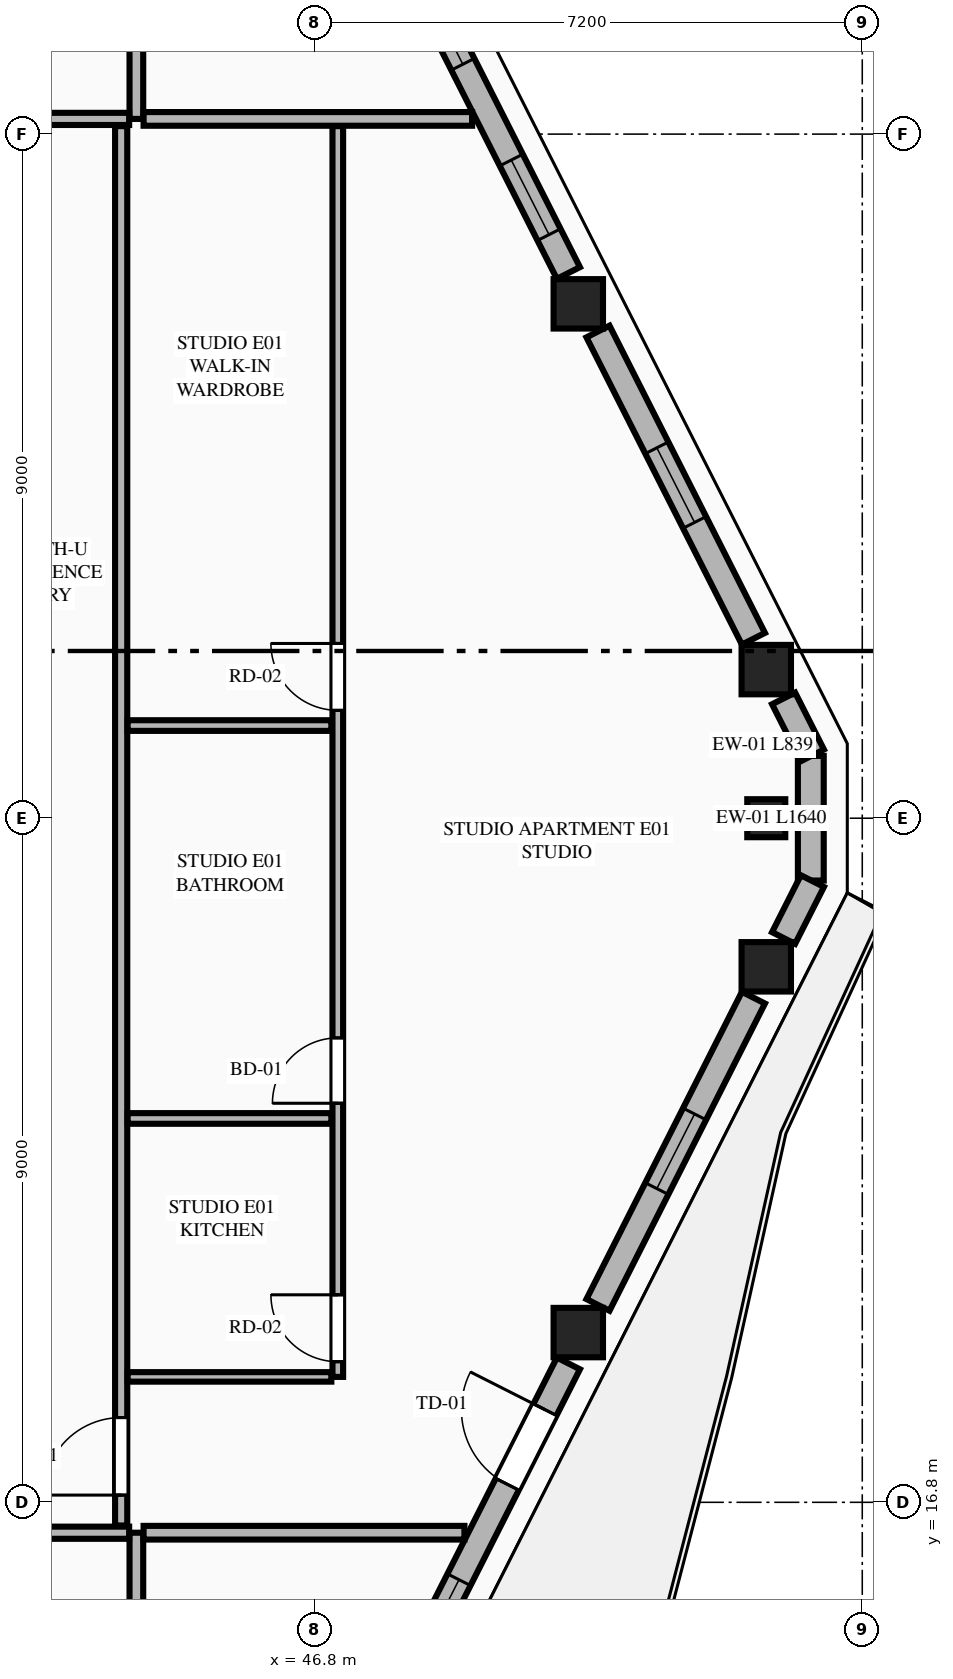
"""IFC4 building model, lengths in metres.
Left out: names, types, materials, properties, quantities, classifications, styles, units other than length and angle.
Written with IfcOpenShell. Run it as: python <this file> out.ifc"""

import sys

from ifc_helpers import new_model, si_unit, direction, frame, frame_2d, origin, origin_2d, place, context, subcontext, project, spatial, rectangle, extrude, element, fill, save


model = new_model("IFC4")
c1 = context("Model", 3, precision=1e-05, world=origin(), true_north=direction((0.0, 1.0)))
c2 = subcontext(c1, "Body", "Model", "MODEL_VIEW")
j1 = project(units=[si_unit("LENGTHUNIT", "METRE"), si_unit("PLANEANGLEUNIT", "RADIAN")], contexts=[c1])
p1 = place(None, origin())
s1 = spatial("IfcSite", under=j1, at=p1, CompositionType="ELEMENT")
p2 = place(p1, origin())
s2 = spatial("IfcBuilding", under=s1, at=p2, CompositionType="ELEMENT")
p3 = place(p2, frame((0.0, 0.0, 274.45)))
s3 = spatial("IfcBuildingStorey", under=s2, at=p3, CompositionType="ELEMENT", Elevation=274.45)
for number, where, z_axis, x_axis in (
    (1, (50.264, 19.033, 0.0), (0.0, 0.0, 1.0), (1.0, 0.0, 0.0)),
    (2, (52.737, 23.845, 0.0), (0.0, 0.0, 1.0), (1.0, 0.0, 0.0)),
    (3, (52.737, 27.755, 0.0), (0.0, 0.0, 1.0), (1.0, 0.0, 0.0)),
    (4, (50.264, 32.567, 0.0), (0.0, 0.0, 1.0), (1.0, 0.0, 0.0)),
):
    element("IfcColumn", number, at=place(p3, frame(where, z_axis=z_axis, x_axis=x_axis)), inside=s3, PredefinedType="COLUMN", context=c2, shape_type="SweptSolid", body=[
        extrude(rectangle(XDim=0.65, YDim=0.65, at=origin_2d()), origin(), (0.0, 0.0, 1.0), 3.65),
    ])
p4 = place(p3, frame((52.737, 25.8, 0.0), z_axis=(0.0, 0.0, 1.0), x_axis=(0.0, 1.0, 0.0)))
e5 = element("IfcColumn", 5, at=p4, inside=s3, PredefinedType="PILASTER", context=c2, shape_type="SweptSolid", body=[
    extrude(rectangle(XDim=0.5, YDim=0.35, at=origin_2d()), origin(), (0.0, 0.0, 1.0), 3.65),
])
p5 = place(p3, frame((53.323, 24.98, 0.0), z_axis=(0.0, 0.0, 1.0), x_axis=(0.0, 1.0, 0.0)))
e6 = element("IfcWall", 6, at=p5, inside=s3, PredefinedType="STANDARD", context=c2, shape_type="SweptSolid", body=[
    extrude(rectangle(XDim=1.64, YDim=0.34, at=frame_2d((0.82, 0.0))), origin(), (0.0, 0.0, 1.0), 3.37),
])
p6 = place(p3, frame((48.002, 14.413, 0.0), z_axis=(0.0, 0.0, 1.0), x_axis=(0.451468341582, 0.892287137949, 0.0)))
e7 = element("IfcWall", 7, at=p6, inside=s3, PredefinedType="STANDARD", context=c2, shape_type="SweptSolid", body=[
    extrude(rectangle(XDim=4.723, YDim=0.34, at=frame_2d((2.361, 0.0))), origin(), (0.0, 0.0, 1.0), 2.46),
])
p7 = place(p6, frame((2.941, 0.0, 0.0)))
e8 = element("IfcOpeningElement", 8, at=p7, cuts=e7, PredefinedType="OPENING", context=c2, shape_type="SweptSolid", body=[
    extrude(rectangle(XDim=1.1, YDim=2.25, at=frame_2d((0.55, 1.125))), frame((0.0, 0.18, 0.0), z_axis=(0.0, -1.0, 0.0), x_axis=(1.0, 0.0, 0.0)), (0.0, 0.0, 1.0), 0.36),
])
p8 = place(p6, frame((0.434, 0.0, 0.75)))
e9 = element("IfcOpeningElement", 9, at=p8, cuts=e7, PredefinedType="OPENING", context=c2, shape_type="SweptSolid", body=[
    extrude(rectangle(XDim=1.1, YDim=1.56, at=frame_2d((0.55, 0.78))), frame((0.0, 0.18, 0.0), z_axis=(0.0, -1.0, 0.0), x_axis=(1.0, 0.0, 0.0)), (0.0, 0.0, 1.0), 0.36),
])
p9 = place(p3, frame((50.523, 19.397, 0.0), z_axis=(0.0, 0.0, 1.0), x_axis=(0.45147697324, 0.892282770558, 0.0)))
e10 = element("IfcWall", 10, at=p9, inside=s3, PredefinedType="STANDARD", context=c2, shape_type="SweptSolid", body=[
    extrude(rectangle(XDim=4.53, YDim=0.34, at=frame_2d((2.265, 0.0))), origin(), (0.0, 0.0, 1.0), 2.46),
])
p10 = place(p9, frame((1.715, 0.0, 0.75)))
e11 = element("IfcOpeningElement", 11, at=p10, cuts=e10, PredefinedType="OPENING", context=c2, shape_type="SweptSolid", body=[
    extrude(rectangle(XDim=1.1, YDim=1.56, at=frame_2d((0.55, 0.78))), frame((0.0, 0.18, 0.0), z_axis=(0.0, -1.0, 0.0), x_axis=(1.0, 0.0, 0.0)), (0.0, 0.0, 1.0), 0.36),
])
p11 = place(p3, frame((52.965, 24.224, 0.0), z_axis=(0.0, 0.0, 1.0), x_axis=(0.4515140893, 0.892263989615, 0.0)))
e12 = element("IfcWall", 12, at=p11, inside=s3, PredefinedType="STANDARD", context=c2, shape_type="SweptSolid", body=[
    extrude(rectangle(XDim=0.839, YDim=0.34, at=frame_2d((0.419, 0.0))), origin(), (0.0, 0.0, 1.0), 3.37),
])
p12 = place(p3, frame((53.344, 26.627, 0.0), z_axis=(0.0, 0.0, 1.0), x_axis=(-0.45139691133, 0.892323275748, 0.0)))
e13 = element("IfcWall", 13, at=p12, inside=s3, PredefinedType="STANDARD", context=c2, shape_type="SweptSolid", body=[
    extrude(rectangle(XDim=0.839, YDim=0.34, at=frame_2d((0.42, 0.0))), origin(), (0.0, 0.0, 1.0), 3.37),
])
p13 = place(p3, frame((52.568, 28.161, 0.0), z_axis=(0.0, 0.0, 1.0), x_axis=(-0.45147697324, 0.892282770558, 0.0)))
e14 = element("IfcWall", 14, at=p13, inside=s3, PredefinedType="STANDARD", context=c2, shape_type="SweptSolid", body=[
    extrude(rectangle(XDim=4.53, YDim=0.34, at=frame_2d((2.265, 0.0))), origin(), (0.0, 0.0, 1.0), 2.46),
])
p14 = place(p13, frame((1.715, 0.0, 0.75)))
e15 = element("IfcOpeningElement", 15, at=p14, cuts=e14, PredefinedType="OPENING", context=c2, shape_type="SweptSolid", body=[
    extrude(rectangle(XDim=1.1, YDim=1.56, at=frame_2d((0.55, 0.78))), frame((0.0, 0.18, 0.0), z_axis=(0.0, -1.0, 0.0), x_axis=(1.0, 0.0, 0.0)), (0.0, 0.0, 1.0), 0.36),
])
p15 = place(p3, frame((50.134, 32.973, 0.0), z_axis=(0.0, 0.0, 1.0), x_axis=(-0.451447516904, 0.892297674255, 0.0)))
e16 = element("IfcWall", 16, at=p15, inside=s3, PredefinedType="STANDARD", context=c2, shape_type="SweptSolid", body=[
    extrude(rectangle(XDim=4.723, YDim=0.34, at=frame_2d((2.361, 0.0))), origin(), (0.0, 0.0, 1.0), 2.46),
])
p16 = place(p15, frame((0.565, 0.0, 0.75)))
e17 = element("IfcOpeningElement", 17, at=p16, cuts=e16, PredefinedType="OPENING", context=c2, shape_type="SweptSolid", body=[
    extrude(rectangle(XDim=1.1, YDim=1.56, at=frame_2d((0.55, 0.78))), frame((0.0, 0.18, 0.0), z_axis=(0.0, -1.0, 0.0), x_axis=(1.0, 0.0, 0.0)), (0.0, 0.0, 1.0), 0.36),
])
p17 = place(p15, frame((3.077, 0.0, 0.75)))
e18 = element("IfcOpeningElement", 18, at=p17, cuts=e16, PredefinedType="OPENING", context=c2, shape_type="SweptSolid", body=[
    extrude(rectangle(XDim=1.1, YDim=1.56, at=frame_2d((0.55, 0.78))), frame((0.0, 0.18, 0.0), z_axis=(0.0, -1.0, 0.0), x_axis=(1.0, 0.0, 0.0)), (0.0, 0.0, 1.0), 0.36),
])
p18 = place(p3, frame((44.45, 8.119, 0.0), z_axis=(0.0, 0.0, 1.0), x_axis=(0.0, 1.0, 0.0)))
e19 = element("IfcWall", 19, at=p18, inside=s3, PredefinedType="PARTITIONING", context=c2, shape_type="SweptSolid", body=[
    extrude(rectangle(XDim=8.281, YDim=0.18, at=frame_2d((4.141, 0.0))), origin(), (0.0, 0.0, 1.0), 3.37),
])
p19 = place(p3, frame((35.749, 16.4, 0.0), z_axis=(0.0, 0.0, 1.0), x_axis=(1.0, 0.0, 0.0)))
e20 = element("IfcWall", 20, at=p19, inside=s3, PredefinedType="PARTITIONING", context=c2, shape_type="SweptSolid", body=[
    extrude(rectangle(XDim=8.606, YDim=0.16, at=frame_2d((4.303, 0.0))), origin(), (0.0, 0.0, 1.0), 3.37),
])
p20 = place(p19, frame((0.355, 0.0, 0.0)))
e21 = element("IfcOpeningElement", 21, at=p20, cuts=e20, PredefinedType="OPENING", context=c2, shape_type="SweptSolid", body=[
    extrude(rectangle(XDim=1.02, YDim=2.25, at=frame_2d((0.51, 1.125))), frame((0.0, 0.09, 0.0), z_axis=(0.0, -1.0, 0.0), x_axis=(1.0, 0.0, 0.0)), (0.0, 0.0, 1.0), 0.18),
])
p21 = place(p3, frame((44.45, 35.0, 0.0), z_axis=(0.0, 0.0, 1.0), x_axis=(0.0, 1.0, 0.0)))
e22 = element("IfcWall", 22, at=p21, inside=s3, PredefinedType="PARTITIONING", context=c2, shape_type="SweptSolid", body=[
    extrude(rectangle(XDim=8.481, YDim=0.18, at=frame_2d((4.24, 0.0))), origin(), (0.0, 0.0, 1.0), 3.37),
])
p22 = place(p3, frame((35.749, 35.0, 0.0), z_axis=(0.0, 0.0, 1.0), x_axis=(1.0, 0.0, 0.0)))
e23 = element("IfcWall", 23, at=p22, inside=s3, PredefinedType="PARTITIONING", context=c2, shape_type="SweptSolid", body=[
    extrude(rectangle(XDim=8.606, YDim=0.16, at=frame_2d((4.303, 0.0))), origin(), (0.0, 0.0, 1.0), 3.37),
])
p23 = place(p22, frame((6.351, 0.0, 0.0)))
e24 = element("IfcOpeningElement", 24, at=p23, cuts=e23, PredefinedType="OPENING", context=c2, shape_type="SweptSolid", body=[
    extrude(rectangle(XDim=1.02, YDim=2.25, at=frame_2d((0.51, 1.125))), frame((0.0, 0.09, 0.0), z_axis=(0.0, -1.0, 0.0), x_axis=(1.0, 0.0, 0.0)), (0.0, 0.0, 1.0), 0.18),
])
p24 = place(p3, frame((44.545, 16.4, 0.0), z_axis=(0.0, 0.0, 1.0), x_axis=(1.0, 0.0, 0.0)))
e25 = element("IfcWall", 25, at=p24, inside=s3, PredefinedType="PARTITIONING", context=c2, shape_type="SweptSolid", body=[
    extrude(rectangle(XDim=4.221, YDim=0.18, at=frame_2d((2.111, 0.0))), origin(), (0.0, 0.0, 1.0), 3.37),
])
p25 = place(p3, frame((44.545, 35.0, 0.0), z_axis=(0.0, 0.0, 1.0), x_axis=(1.0, 0.0, 0.0)))
e26 = element("IfcWall", 26, at=p25, inside=s3, PredefinedType="PARTITIONING", context=c2, shape_type="SweptSolid", body=[
    extrude(rectangle(XDim=4.322, YDim=0.18, at=frame_2d((2.161, 0.0))), origin(), (0.0, 0.0, 1.0), 3.37),
])
p26 = place(p3, frame((44.25, 16.495, 0.0), z_axis=(0.0, 0.0, 1.0), x_axis=(0.0, 1.0, 0.0)))
e27 = element("IfcWall", 27, at=p26, inside=s3, PredefinedType="PARTITIONING", context=c2, shape_type="SweptSolid", body=[
    extrude(rectangle(XDim=18.41, YDim=0.16, at=frame_2d((9.205, 0.0))), origin(), (0.0, 0.0, 1.0), 3.057),
])
p27 = place(p26, frame((0.4, 0.0, 0.0)))
e28 = element("IfcOpeningElement", 28, at=p27, cuts=e27, PredefinedType="OPENING", context=c2, shape_type="SweptSolid", body=[
    extrude(rectangle(XDim=1.02, YDim=2.25, at=frame_2d((0.51, 1.125))), frame((0.0, 0.09, 0.0), z_axis=(0.0, -1.0, 0.0), x_axis=(1.0, 0.0, 0.0)), (0.0, 0.0, 1.0), 0.18),
])
p28 = place(p3, frame((44.335, 18.45, 0.0), z_axis=(0.0, 0.0, 1.0), x_axis=(1.0, 0.0, 0.0)))
e29 = element("IfcWall", 29, at=p28, inside=s3, PredefinedType="PARTITIONING", context=c2, shape_type="SweptSolid", body=[
    extrude(rectangle(XDim=2.68, YDim=0.125, at=frame_2d((1.34, 0.0))), origin(), (0.0, 0.0, 1.0), 3.37),
])
p29 = place(p3, frame((47.1, 18.45, 0.0), z_axis=(0.0, 0.0, 1.0), x_axis=(0.0, 1.0, 0.0)))
e30 = element("IfcWall", 30, at=p29, inside=s3, PredefinedType="PLUMBINGWALL", context=c2, shape_type="SweptSolid", body=[
    extrude(rectangle(XDim=16.455, YDim=0.14, at=frame_2d((8.228, 0.0))), origin(), (0.0, 0.0, 1.0), 3.37),
])
p30 = place(p29, frame((3.6, 0.0, 0.0)))
e31 = element("IfcOpeningElement", 31, at=p30, cuts=e30, PredefinedType="OPENING", context=c2, shape_type="SweptSolid", body=[
    extrude(rectangle(XDim=0.86, YDim=2.1, at=frame_2d((0.43, 1.05))), frame((0.0, 0.08, 0.0), z_axis=(0.0, -1.0, 0.0), x_axis=(1.0, 0.0, 0.0)), (0.0, 0.0, 1.0), 0.16),
])
p31 = place(p29, frame((8.769, 0.0, 0.0)))
e32 = element("IfcOpeningElement", 32, at=p31, cuts=e30, PredefinedType="OPENING", context=c2, shape_type="SweptSolid", body=[
    extrude(rectangle(XDim=0.88, YDim=2.15, at=frame_2d((0.44, 1.075))), frame((0.0, 0.08, 0.0), z_axis=(0.0, -1.0, 0.0), x_axis=(1.0, 0.0, 0.0)), (0.0, 0.0, 1.0), 0.16),
])
p32 = place(p29, frame((0.2, 0.0, 0.0)))
e33 = element("IfcOpeningElement", 33, at=p32, cuts=e30, PredefinedType="OPENING", context=c2, shape_type="SweptSolid", body=[
    extrude(rectangle(XDim=0.88, YDim=2.15, at=frame_2d((0.44, 1.075))), frame((0.0, 0.08, 0.0), z_axis=(0.0, -1.0, 0.0), x_axis=(1.0, 0.0, 0.0)), (0.0, 0.0, 1.0), 0.16),
])
for number, where, z_axis, x_axis in (
    (34, (44.335, 21.85, 0.0), (0.0, 0.0, 1.0), (1.0, 0.0, 0.0)),
    (35, (44.335, 27.019, 0.0), (0.0, 0.0, 1.0), (1.0, 0.0, 0.0)),
):
    element("IfcWall", number, at=place(p3, frame(where, z_axis=z_axis, x_axis=x_axis)), inside=s3, PredefinedType="PLUMBINGWALL", context=c2, shape_type="SweptSolid", body=[
        extrude(rectangle(XDim=2.68, YDim=0.14, at=frame_2d((1.34, 0.0))), origin(), (0.0, 0.0, 1.0), 3.37),
    ])
p33 = place(p7, origin())
e36 = element("IfcDoor", 36, at=p33, inside=s3, OperationType="SINGLE_SWING_RIGHT", PredefinedType="DOOR", context=c2, shape_type="SweptSolid", body=[
    extrude(rectangle(XDim=1.1, YDim=2.25, at=frame_2d((0.55, 1.125))), frame((0.0, 0.025, 0.0), z_axis=(0.0, -1.0, 0.0), x_axis=(1.0, 0.0, 0.0)), (0.0, 0.0, 1.0), 0.05),
])
fill(e8, e36)
p34 = place(p10, origin())
e37 = element("IfcWindow", 37, at=p34, inside=s3, PartitioningType="SINGLE_PANEL", PredefinedType="WINDOW", context=c2, shape_type="SweptSolid", body=[
    extrude(rectangle(XDim=1.1, YDim=1.56, at=frame_2d((0.55, 0.78))), frame((0.0, 0.03, 0.0), z_axis=(0.0, -1.0, 0.0), x_axis=(1.0, 0.0, 0.0)), (0.0, 0.0, 1.0), 0.06),
])
fill(e11, e37)
p35 = place(p14, origin())
e38 = element("IfcWindow", 38, at=p35, inside=s3, PartitioningType="SINGLE_PANEL", PredefinedType="WINDOW", context=c2, shape_type="SweptSolid", body=[
    extrude(rectangle(XDim=1.1, YDim=1.56, at=frame_2d((0.55, 0.78))), frame((0.0, 0.03, 0.0), z_axis=(0.0, -1.0, 0.0), x_axis=(1.0, 0.0, 0.0)), (0.0, 0.0, 1.0), 0.06),
])
fill(e15, e38)
p36 = place(p16, origin())
e39 = element("IfcWindow", 39, at=p36, inside=s3, PartitioningType="SINGLE_PANEL", PredefinedType="WINDOW", context=c2, shape_type="SweptSolid", body=[
    extrude(rectangle(XDim=1.1, YDim=1.56, at=frame_2d((0.55, 0.78))), frame((0.0, 0.03, 0.0), z_axis=(0.0, -1.0, 0.0), x_axis=(1.0, 0.0, 0.0)), (0.0, 0.0, 1.0), 0.06),
])
fill(e17, e39)
p37 = place(p30, origin())
e40 = element("IfcDoor", 40, at=p37, inside=s3, OperationType="SINGLE_SWING_LEFT", PredefinedType="DOOR", context=c2, shape_type="SweptSolid", body=[
    extrude(rectangle(XDim=0.86, YDim=2.1, at=frame_2d((0.43, 1.05))), frame((0.0, 0.025, 0.0), z_axis=(0.0, -1.0, 0.0), x_axis=(1.0, 0.0, 0.0)), (0.0, 0.0, 1.0), 0.05),
])
fill(e31, e40)
p38 = place(p31, origin())
e41 = element("IfcDoor", 41, at=p38, inside=s3, OperationType="SINGLE_SWING_RIGHT", PredefinedType="DOOR", context=c2, shape_type="SweptSolid", body=[
    extrude(rectangle(XDim=0.88, YDim=2.15, at=frame_2d((0.44, 1.075))), frame((0.0, 0.025, 0.0), z_axis=(0.0, -1.0, 0.0), x_axis=(1.0, 0.0, 0.0)), (0.0, 0.0, 1.0), 0.05),
])
fill(e32, e41)
p39 = place(p27, origin())
e42 = element("IfcDoor", 42, at=p39, inside=s3, OperationType="SINGLE_SWING_LEFT", PredefinedType="DOOR", context=c2, shape_type="SweptSolid", body=[
    extrude(rectangle(XDim=1.02, YDim=2.25, at=frame_2d((0.51, 1.125))), frame((0.0, 0.025, 0.0), z_axis=(0.0, -1.0, 0.0), x_axis=(1.0, 0.0, 0.0)), (0.0, 0.0, 1.0), 0.05),
])
fill(e28, e42)
p40 = place(p32, origin())
e43 = element("IfcDoor", 43, at=p40, inside=s3, OperationType="SINGLE_SWING_RIGHT", PredefinedType="DOOR", context=c2, shape_type="SweptSolid", body=[
    extrude(rectangle(XDim=0.88, YDim=2.15, at=frame_2d((0.44, 1.075))), frame((0.0, 0.025, 0.0), z_axis=(0.0, -1.0, 0.0), x_axis=(1.0, 0.0, 0.0)), (0.0, 0.0, 1.0), 0.05),
])
fill(e33, e43)
p41 = place(p8, origin())
e44 = element("IfcWindow", 44, at=p41, inside=s3, PartitioningType="SINGLE_PANEL", PredefinedType="WINDOW", context=c2, shape_type="SweptSolid", body=[
    extrude(rectangle(XDim=1.1, YDim=1.56, at=frame_2d((0.55, 0.78))), frame((0.0, 0.03, 0.0), z_axis=(0.0, -1.0, 0.0), x_axis=(1.0, 0.0, 0.0)), (0.0, 0.0, 1.0), 0.06),
])
fill(e9, e44)
p42 = place(p17, origin())
e45 = element("IfcWindow", 45, at=p42, inside=s3, PartitioningType="SINGLE_PANEL", PredefinedType="WINDOW", context=c2, shape_type="SweptSolid", body=[
    extrude(rectangle(XDim=1.1, YDim=1.56, at=frame_2d((0.55, 0.78))), frame((0.0, 0.03, 0.0), z_axis=(0.0, -1.0, 0.0), x_axis=(1.0, 0.0, 0.0)), (0.0, 0.0, 1.0), 0.06),
])
fill(e18, e45)
save(model, sys.argv[1])
